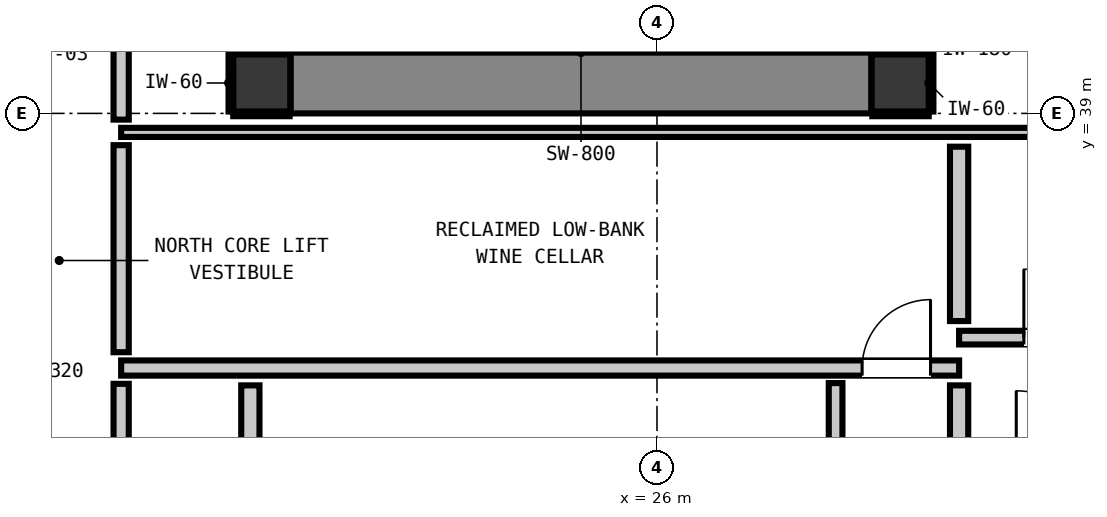
"""IFC4 building model, lengths in metres.
Left out: names, types, materials, properties, quantities, classifications, styles, units other than length and angle.
Written with IfcOpenShell. Run it as: python <this file> out.ifc"""

import sys

from ifc_helpers import new_model, si_unit, direction, frame, frame_2d, origin, origin_2d, place, context, subcontext, project, spatial, rectangle, extrude, element, fill, save


model = new_model("IFC4")
c1 = context("Model", 3, precision=1e-05, world=origin(), true_north=direction((0.0, 1.0)))
c2 = subcontext(c1, "Body", "Model", "MODEL_VIEW")
j1 = project(units=[si_unit("LENGTHUNIT", "METRE"), si_unit("PLANEANGLEUNIT", "RADIAN")], contexts=[c1])
p1 = place(None, origin())
s1 = spatial("IfcSite", under=j1, at=p1, CompositionType="ELEMENT")
p2 = place(p1, origin())
s2 = spatial("IfcBuilding", under=s1, at=p2, CompositionType="ELEMENT")
p3 = place(p2, frame((0.0, 0.0, 234.6)))
s3 = spatial("IfcBuildingStorey", under=s2, at=p3, CompositionType="ELEMENT", Elevation=234.6)
for number, where, z_axis, x_axis in (
    (1, (20.8, 39.4, 0.0), (0.0, 0.0, 1.0), (1.0, 0.0, 0.0)),
    (2, (29.2, 39.4, 0.0), (0.0, 0.0, 1.0), (1.0, 0.0, 0.0)),
):
    element("IfcColumn", number, at=place(p3, frame(where, z_axis=z_axis, x_axis=x_axis)), inside=s3, PredefinedType="COLUMN", context=c2, shape_type="SweptSolid", body=[
        extrude(rectangle(XDim=0.75, YDim=0.75, at=origin_2d()), origin(), (0.0, 0.0, 1.0), 3.32),
    ])
p4 = place(p3, frame((21.18, 39.4, 0.0), z_axis=(0.0, 0.0, 1.0), x_axis=(1.0, 0.0, 0.0)))
e3 = element("IfcWall", 3, at=p4, inside=s3, PredefinedType="SHEAR", context=c2, shape_type="SweptSolid", body=[
    extrude(rectangle(XDim=7.64, YDim=0.8, at=frame_2d((3.82, 0.0))), origin(), (0.0, 0.0, 1.0), 3.32),
])
p5 = place(p3, frame((18.95, 35.65, 0.0), z_axis=(0.0, 0.0, 1.0), x_axis=(1.0, 0.0, 0.0)))
e4 = element("IfcWall", 4, at=p5, inside=s3, PredefinedType="PARTITIONING", context=c2, shape_type="SweptSolid", body=[
    extrude(rectangle(XDim=11.025, YDim=0.2, at=frame_2d((5.513, 0.0))), origin(), (0.0, 0.0, 1.0), 3.1),
])
p6 = place(p5, frame((9.749, 0.0, 0.0)))
e5 = element("IfcOpeningElement", 5, at=p6, cuts=e4, PredefinedType="OPENING", context=c2, shape_type="SweptSolid", body=[
    extrude(rectangle(XDim=0.9, YDim=2.1, at=frame_2d((0.45, 1.05))), frame((0.0, 0.11, 0.0), z_axis=(0.0, -1.0, 0.0), x_axis=(1.0, 0.0, 0.0)), (0.0, 0.0, 1.0), 0.22),
])
p7 = place(p3, frame((29.975, 36.05, 0.0), z_axis=(0.0, 0.0, 1.0), x_axis=(1.0, 0.0, 0.0)))
e6 = element("IfcWall", 6, at=p7, inside=s3, PredefinedType="PARTITIONING", context=c2, shape_type="SweptSolid", body=[
    extrude(rectangle(XDim=2.505, YDim=0.18, at=frame_2d((1.252, 0.0))), origin(), (0.0, 0.0, 1.0), 3.1),
])
p8 = place(p7, frame((0.852, 0.0, 0.0)))
e7 = element("IfcOpeningElement", 7, at=p8, cuts=e6, PredefinedType="OPENING", context=c2, shape_type="SweptSolid", body=[
    extrude(rectangle(XDim=0.9, YDim=2.1, at=frame_2d((0.45, 1.05))), frame((0.0, 0.1, 0.0), z_axis=(0.0, -1.0, 0.0), x_axis=(1.0, 0.0, 0.0)), (0.0, 0.0, 1.0), 0.2),
])
p9 = place(p3, frame((18.95, 38.75, 0.0), z_axis=(0.0, 0.0, 1.0), x_axis=(1.0, 0.0, 0.0)))
e8 = element("IfcWall", 8, at=p9, inside=s3, PredefinedType="PARTITIONING", context=c2, shape_type="SweptSolid", body=[
    extrude(rectangle(XDim=13.56, YDim=0.12, at=frame_2d((6.78, 0.0))), origin(), (0.0, 0.0, 1.0), 3.1),
])
p10 = place(p3, frame((20.65, 33.148, 0.0), z_axis=(0.0, 0.0, 1.0), x_axis=(0.0, 1.0, 0.0)))
e9 = element("IfcWall", 9, at=p10, inside=s3, PredefinedType="PARTITIONING", context=c2, shape_type="SweptSolid", body=[
    extrude(rectangle(XDim=2.274, YDim=0.24, at=frame_2d((1.137, 0.0))), origin(), (0.0, 0.0, 1.0), 2.335),
])
p11 = place(p3, frame((29.975, 34.498, 0.0), z_axis=(0.0, 0.0, 1.0), x_axis=(0.0, 1.0, 0.0)))
e10 = element("IfcWall", 10, at=p11, inside=s3, PredefinedType="PARTITIONING", context=c2, shape_type="SweptSolid", body=[
    extrude(rectangle(XDim=0.924, YDim=0.24, at=frame_2d((0.462, 0.0))), origin(), (0.0, 0.0, 1.0), 3.1),
])
p12 = place(p3, frame((29.975, 36.268, 0.0), z_axis=(0.0, 0.0, 1.0), x_axis=(0.0, 1.0, 0.0)))
e11 = element("IfcWall", 11, at=p12, inside=s3, PredefinedType="PARTITIONING", context=c2, shape_type="SweptSolid", body=[
    extrude(rectangle(XDim=2.294, YDim=0.24, at=frame_2d((1.147, 0.0))), origin(), (0.0, 0.0, 1.0), 3.1),
])
p13 = place(p3, frame((18.95, 33.128, 0.0), z_axis=(0.0, 0.0, 1.0), x_axis=(0.0, 1.0, 0.0)))
e12 = element("IfcWall", 12, at=p13, inside=s3, PredefinedType="PARTITIONING", context=c2, shape_type="SweptSolid", body=[
    extrude(rectangle(XDim=2.314, YDim=0.2, at=frame_2d((1.157, 0.0))), origin(), (0.0, 0.0, 1.0), 3.1),
])
p14 = place(p3, frame((18.95, 35.858, 0.0), z_axis=(0.0, 0.0, 1.0), x_axis=(0.0, 1.0, 0.0)))
e13 = element("IfcWall", 13, at=p14, inside=s3, PredefinedType="PARTITIONING", context=c2, shape_type="SweptSolid", body=[
    extrude(rectangle(XDim=2.724, YDim=0.2, at=frame_2d((1.362, 0.0))), origin(), (0.0, 0.0, 1.0), 3.1),
])
p15 = place(p3, frame((18.95, 38.918, 0.0), z_axis=(0.0, 0.0, 1.0), x_axis=(0.0, 1.0, 0.0)))
e14 = element("IfcWall", 14, at=p15, inside=s3, PredefinedType="PARTITIONING", context=c2, shape_type="SweptSolid", body=[
    extrude(rectangle(XDim=1.134, YDim=0.2, at=frame_2d((0.567, 0.0))), origin(), (0.0, 0.0, 1.0), 3.1),
])
p16 = place(p3, frame((28.35, 31.838, 0.0), z_axis=(0.0, 0.0, 1.0), x_axis=(0.0, 1.0, 0.0)))
e15 = element("IfcWall", 15, at=p16, inside=s3, PredefinedType="PARTITIONING", context=c2, shape_type="SweptSolid", body=[
    extrude(rectangle(XDim=3.614, YDim=0.18, at=frame_2d((1.807, 0.0))), origin(), (0.0, 0.0, 1.0), 3.1),
])
for number, where, z_axis, x_axis in (
    (16, (20.425, 38.993, 0.0), (0.0, 0.0, 1.0), (1.0, 0.0, 0.0)),
    (17, (20.425, 39.807, 0.0), (0.0, 0.0, 1.0), (1.0, 0.0, 0.0)),
):
    element("IfcWall", number, at=place(p3, frame(where, z_axis=z_axis, x_axis=x_axis)), inside=s3, PredefinedType="PARTITIONING", context=c2, shape_type="SweptSolid", body=[
        extrude(rectangle(XDim=0.742, YDim=0.06, at=frame_2d((0.371, 0.0))), origin(), (0.0, 0.0, 1.0), 1.45),
    ])
p17 = place(p3, frame((20.393, 39.025, 0.0), z_axis=(0.0, 0.0, 1.0), x_axis=(0.0, 1.0, 0.0)))
e18 = element("IfcWall", 18, at=p17, inside=s3, PredefinedType="PARTITIONING", context=c2, shape_type="SweptSolid", body=[
    extrude(rectangle(XDim=0.75, YDim=0.06, at=frame_2d((0.375, 0.0))), origin(), (0.0, 0.0, 1.0), 1.45),
])
for number, where, z_axis, x_axis in (
    (19, (28.833, 38.993, 0.0), (0.0, 0.0, 1.0), (1.0, 0.0, 0.0)),
    (20, (28.833, 39.807, 0.0), (0.0, 0.0, 1.0), (1.0, 0.0, 0.0)),
):
    element("IfcWall", number, at=place(p3, frame(where, z_axis=z_axis, x_axis=x_axis)), inside=s3, PredefinedType="PARTITIONING", context=c2, shape_type="SweptSolid", body=[
        extrude(rectangle(XDim=0.742, YDim=0.06, at=frame_2d((0.371, 0.0))), origin(), (0.0, 0.0, 1.0), 1.45),
    ])
p18 = place(p3, frame((29.607, 39.025, 0.0), z_axis=(0.0, 0.0, 1.0), x_axis=(0.0, 1.0, 0.0)))
e21 = element("IfcWall", 21, at=p18, inside=s3, PredefinedType="PARTITIONING", context=c2, shape_type="SweptSolid", body=[
    extrude(rectangle(XDim=0.75, YDim=0.06, at=frame_2d((0.375, 0.0))), origin(), (0.0, 0.0, 1.0), 1.45),
])
p19 = place(p8, origin())
e22 = element("IfcDoor", 22, at=p19, inside=s3, OperationType="SINGLE_SWING_LEFT", PredefinedType="DOOR", context=c2, shape_type="SweptSolid", body=[
    extrude(rectangle(XDim=0.9, YDim=2.1, at=frame_2d((0.45, 1.05))), frame((0.0, 0.025, 0.0), z_axis=(0.0, -1.0, 0.0), x_axis=(1.0, 0.0, 0.0)), (0.0, 0.0, 1.0), 0.05),
])
fill(e7, e22)
p20 = place(p6, origin())
e23 = element("IfcDoor", 23, at=p20, inside=s3, OperationType="SINGLE_SWING_RIGHT", PredefinedType="DOOR", context=c2, shape_type="SweptSolid", body=[
    extrude(rectangle(XDim=0.9, YDim=2.1, at=frame_2d((0.45, 1.05))), frame((0.0, 0.025, 0.0), z_axis=(0.0, -1.0, 0.0), x_axis=(1.0, 0.0, 0.0)), (0.0, 0.0, 1.0), 0.05),
])
fill(e5, e23)
save(model, sys.argv[1])
